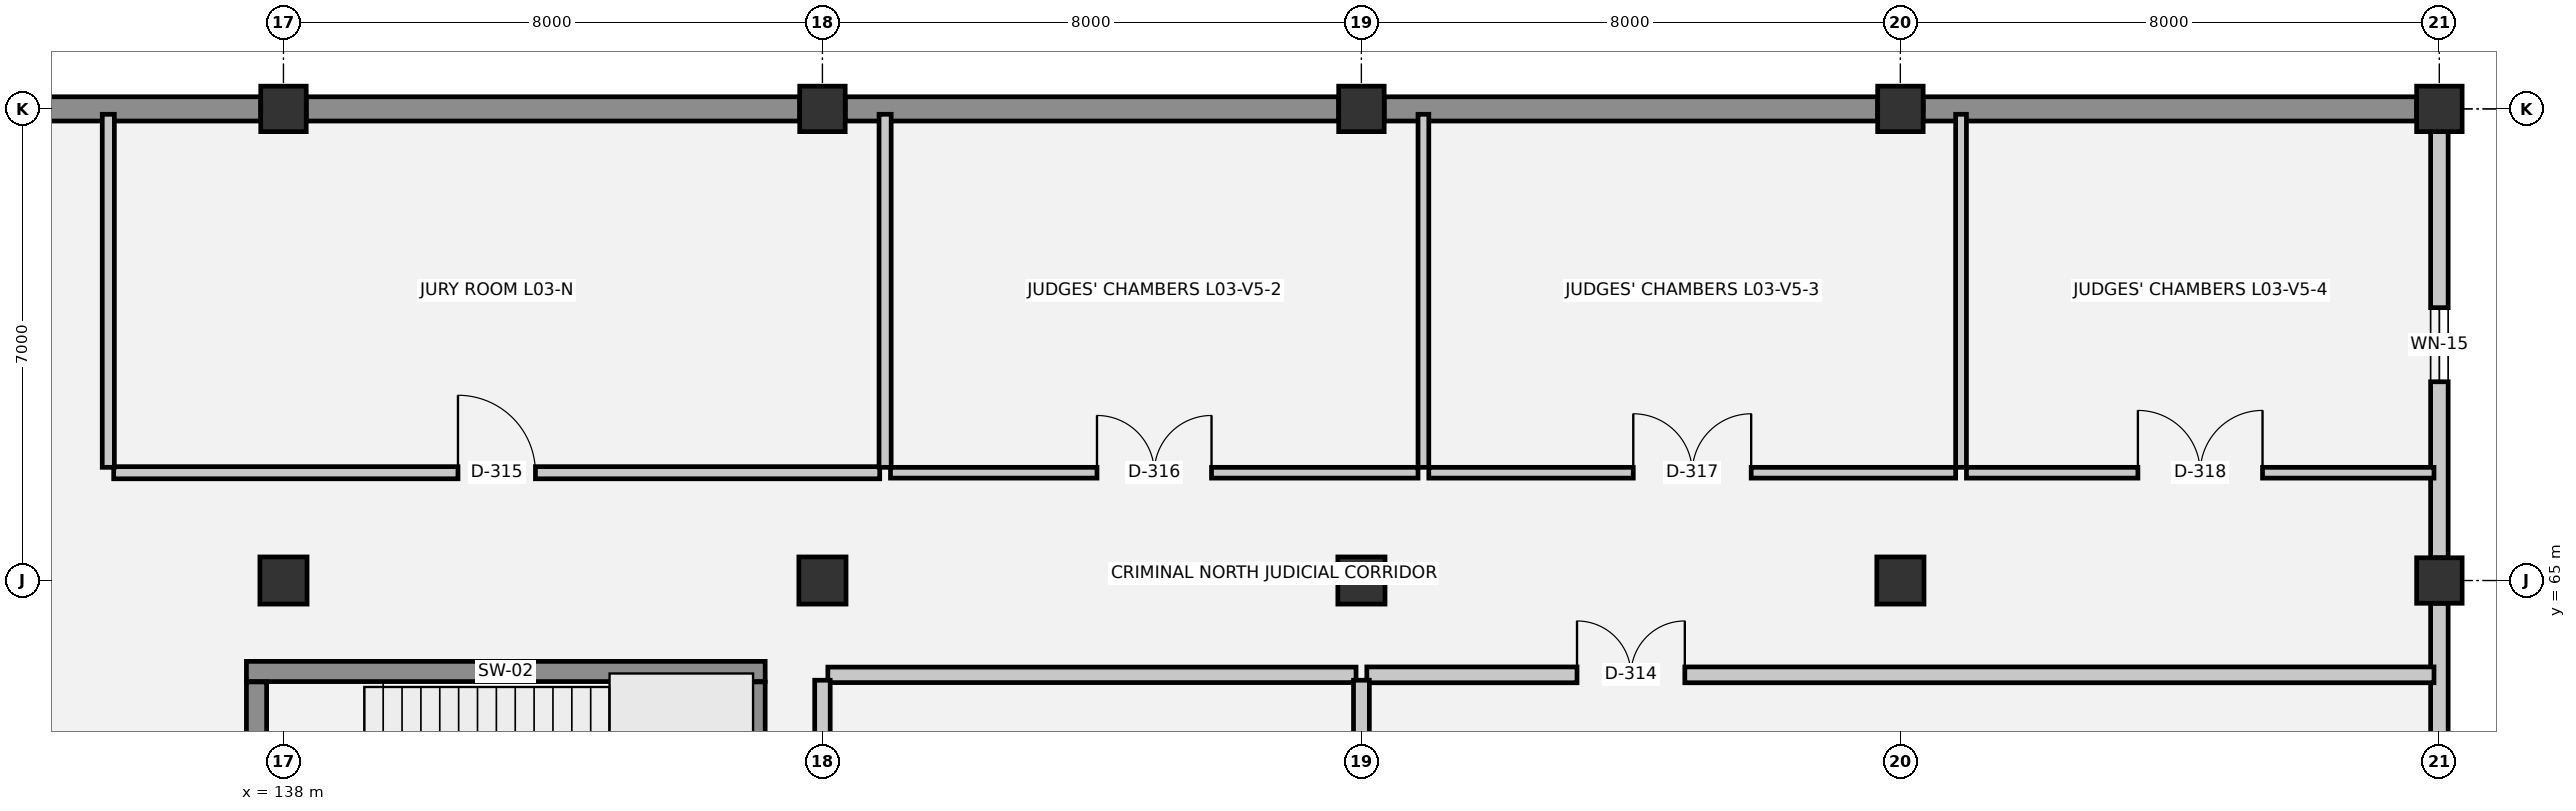
"""IFC4 building model, lengths in metres.
Left out: names, types, materials, properties, quantities, classifications, styles, units other than length and angle.
Written with IfcOpenShell. Run it as: python <this file> out.ifc"""

import sys

from ifc_helpers import new_model, si_unit, direction, frame, frame_2d, origin, origin_2d, place, context, subcontext, project, spatial, rectangle, extrude, element, fill, save


model = new_model("IFC4")
c1 = context("Model", 3, precision=1e-05, world=origin(), true_north=direction((0.0, 1.0)))
c2 = subcontext(c1, "Body", "Model", "MODEL_VIEW")
j1 = project(units=[si_unit("LENGTHUNIT", "METRE"), si_unit("PLANEANGLEUNIT", "RADIAN")], contexts=[c1])
p1 = place(None, origin())
s1 = spatial("IfcSite", under=j1, at=p1, CompositionType="ELEMENT")
p2 = place(p1, origin())
s2 = spatial("IfcBuilding", under=s1, at=p2, CompositionType="ELEMENT")
p3 = place(p2, frame((0.0, 0.0, 9.9)))
s3 = spatial("IfcBuildingStorey", under=s2, at=p3, CompositionType="ELEMENT", Elevation=9.9)
p4 = place(p3, frame((138.0, 65.0, 0.0), z_axis=(0.0, 0.0, 1.0), x_axis=(1.0, 0.0, 0.0)))
e1 = element("IfcColumn", 1, at=p4, inside=s3, PredefinedType="COLUMN", context=c2, shape_type="SweptSolid", body=[
    extrude(rectangle(XDim=0.7, YDim=0.7, at=origin_2d()), origin(), (0.0, 0.0, 1.0), 4.5),
])
p5 = place(p3, frame((138.0, 72.0, 0.0), z_axis=(0.0, 0.0, 1.0), x_axis=(1.0, 0.0, 0.0)))
e2 = element("IfcColumn", 2, at=p5, inside=s3, PredefinedType="COLUMN", context=c2, shape_type="SweptSolid", body=[
    extrude(rectangle(XDim=0.675, YDim=0.675, at=origin_2d()), origin(), (0.0, 0.0, 1.0), 4.5),
])
p6 = place(p3, frame((146.0, 65.0, 0.0), z_axis=(0.0, 0.0, 1.0), x_axis=(1.0, 0.0, 0.0)))
e3 = element("IfcColumn", 3, at=p6, inside=s3, PredefinedType="COLUMN", context=c2, shape_type="SweptSolid", body=[
    extrude(rectangle(XDim=0.7, YDim=0.7, at=origin_2d()), origin(), (0.0, 0.0, 1.0), 4.5),
])
p7 = place(p3, frame((146.0, 72.0, 0.0), z_axis=(0.0, 0.0, 1.0), x_axis=(1.0, 0.0, 0.0)))
e4 = element("IfcColumn", 4, at=p7, inside=s3, PredefinedType="COLUMN", context=c2, shape_type="SweptSolid", body=[
    extrude(rectangle(XDim=0.675, YDim=0.675, at=origin_2d()), origin(), (0.0, 0.0, 1.0), 4.5),
])
p8 = place(p3, frame((154.0, 65.0, 0.0), z_axis=(0.0, 0.0, 1.0), x_axis=(1.0, 0.0, 0.0)))
e5 = element("IfcColumn", 5, at=p8, inside=s3, PredefinedType="COLUMN", context=c2, shape_type="SweptSolid", body=[
    extrude(rectangle(XDim=0.7, YDim=0.7, at=origin_2d()), origin(), (0.0, 0.0, 1.0), 4.5),
])
p9 = place(p3, frame((154.0, 72.0, 0.0), z_axis=(0.0, 0.0, 1.0), x_axis=(1.0, 0.0, 0.0)))
e6 = element("IfcColumn", 6, at=p9, inside=s3, PredefinedType="COLUMN", context=c2, shape_type="SweptSolid", body=[
    extrude(rectangle(XDim=0.675, YDim=0.675, at=origin_2d()), origin(), (0.0, 0.0, 1.0), 4.5),
])
p10 = place(p3, frame((162.0, 65.0, 0.0), z_axis=(0.0, 0.0, 1.0), x_axis=(1.0, 0.0, 0.0)))
e7 = element("IfcColumn", 7, at=p10, inside=s3, PredefinedType="COLUMN", context=c2, shape_type="SweptSolid", body=[
    extrude(rectangle(XDim=0.7, YDim=0.7, at=origin_2d()), origin(), (0.0, 0.0, 1.0), 4.5),
])
for number, where, z_axis, x_axis in (
    (8, (162.0, 72.0, 0.0), (0.0, 0.0, 1.0), (1.0, 0.0, 0.0)),
    (9, (170.0, 65.0, 0.0), (0.0, 0.0, 1.0), (1.0, 0.0, 0.0)),
    (10, (170.0, 72.0, 0.0), (0.0, 0.0, 1.0), (1.0, 0.0, 0.0)),
):
    element("IfcColumn", number, at=place(p3, frame(where, z_axis=z_axis, x_axis=x_axis)), inside=s3, PredefinedType="COLUMN", context=c2, shape_type="SweptSolid", body=[
        extrude(rectangle(XDim=0.675, YDim=0.675, at=origin_2d()), origin(), (0.0, 0.0, 1.0), 4.5),
    ])
for number, where, z_axis, x_axis in (
    (11, (130.337, 72.0, 0.0), (0.0, 0.0, 1.0), (1.0, 0.0, 0.0)),
    (12, (138.337, 72.0, 0.0), (0.0, 0.0, 1.0), (1.0, 0.0, 0.0)),
    (13, (146.337, 72.0, 0.0), (0.0, 0.0, 1.0), (1.0, 0.0, 0.0)),
    (14, (154.337, 72.0, 0.0), (0.0, 0.0, 1.0), (1.0, 0.0, 0.0)),
    (15, (162.337, 72.0, 0.0), (0.0, 0.0, 1.0), (1.0, 0.0, 0.0)),
):
    element("IfcWall", number, at=place(p3, frame(where, z_axis=z_axis, x_axis=x_axis)), inside=s3, PredefinedType="SOLIDWALL", context=c2, shape_type="SweptSolid", body=[
        extrude(rectangle(XDim=7.325, YDim=0.36, at=frame_2d((3.663, 0.0))), origin(), (0.0, 0.0, 1.0), 4.2),
    ])
p11 = place(p3, frame((170.0, 71.663, 0.0), z_axis=(0.0, 0.0, 1.0), x_axis=(0.0, -1.0, 0.0)))
e16 = element("IfcWall", 16, at=p11, inside=s3, PredefinedType="SOLIDWALL", context=c2, shape_type="SweptSolid", body=[
    extrude(rectangle(XDim=6.325, YDim=0.26, at=frame_2d((3.163, 0.0))), origin(), (0.0, 0.0, 1.0), 3.23),
])
p12 = place(p11, frame((2.613, 0.0, 1.0)))
e17 = element("IfcOpeningElement", 17, at=p12, cuts=e16, PredefinedType="OPENING", context=c2, shape_type="SweptSolid", body=[
    extrude(rectangle(XDim=1.1, YDim=1.2, at=frame_2d((0.55, 0.6))), frame((0.0, 0.14, 0.0), z_axis=(0.0, -1.0, 0.0), x_axis=(1.0, 0.0, 0.0)), (0.0, 0.0, 1.0), 0.28),
])
p13 = place(p3, frame((170.0, 64.663, 0.0), z_axis=(0.0, 0.0, 1.0), x_axis=(0.0, -1.0, 0.0)))
e18 = element("IfcWall", 18, at=p13, inside=s3, PredefinedType="SOLIDWALL", context=c2, shape_type="SweptSolid", body=[
    extrude(rectangle(XDim=13.325, YDim=0.26, at=frame_2d((6.663, 0.0))), origin(), (0.0, 0.0, 1.0), 3.23),
])
p14 = place(p13, frame((6.113, 0.0, 1.0)))
e19 = element("IfcOpeningElement", 19, at=p14, cuts=e18, PredefinedType="OPENING", context=c2, shape_type="SweptSolid", body=[
    extrude(rectangle(XDim=1.1, YDim=1.2, at=frame_2d((0.55, 0.6))), frame((0.0, 0.14, 0.0), z_axis=(0.0, -1.0, 0.0), x_axis=(1.0, 0.0, 0.0)), (0.0, 0.0, 1.0), 0.28),
])
p15 = place(p3, frame((145.15, 63.65, 0.0), z_axis=(0.0, 0.0, 1.0), x_axis=(-1.0, 0.0, 0.0)))
e20 = element("IfcWall", 20, at=p15, inside=s3, PredefinedType="SHEAR", context=c2, shape_type="SweptSolid", body=[
    extrude(rectangle(XDim=7.7, YDim=0.3, at=frame_2d((3.85, 0.0))), origin(), (0.0, 0.0, 1.0), 4.2),
])
for number, where, z_axis, x_axis in (
    (21, (137.6, 63.495, 0.0), (0.0, 0.0, 1.0), (0.0, -1.0, 0.0)),
    (22, (145.0, 59.505, 0.0), (0.0, 0.0, 1.0), (0.0, 1.0, 0.0)),
):
    element("IfcWall", number, at=place(p3, frame(where, z_axis=z_axis, x_axis=x_axis)), inside=s3, PredefinedType="SHEAR", context=c2, shape_type="SweptSolid", body=[
        extrude(rectangle(XDim=3.99, YDim=0.3, at=frame_2d((1.995, 0.0))), origin(), (0.0, 0.0, 1.0), 4.2),
    ])
p16 = place(p3, frame((146.08, 63.6, 0.0), z_axis=(0.0, 0.0, 1.0), x_axis=(1.0, 0.0, 0.0)))
e23 = element("IfcWall", 23, at=p16, inside=s3, PredefinedType="PARTITIONING", context=c2, shape_type="SweptSolid", body=[
    extrude(rectangle(XDim=7.84, YDim=0.23, at=frame_2d((3.92, 0.0))), origin(), (0.0, 0.0, 1.0), 4.14),
])
p17 = place(p3, frame((154.08, 63.6, 0.0), z_axis=(0.0, 0.0, 1.0), x_axis=(1.0, 0.0, 0.0)))
e24 = element("IfcWall", 24, at=p17, inside=s3, PredefinedType="PARTITIONING", context=c2, shape_type="SweptSolid", body=[
    extrude(rectangle(XDim=15.84, YDim=0.235, at=frame_2d((7.92, 0.0))), origin(), (0.0, 0.0, 1.0), 4.14),
])
p18 = place(p17, frame((3.12, 0.0, 0.0)))
e25 = element("IfcOpeningElement", 25, at=p18, cuts=e24, PredefinedType="OPENING", context=c2, shape_type="SweptSolid", body=[
    extrude(rectangle(XDim=1.6, YDim=2.25, at=frame_2d((0.8, 1.125))), frame((0.0, 0.127, 0.0), z_axis=(0.0, -1.0, 0.0), x_axis=(1.0, 0.0, 0.0)), (0.0, 0.0, 1.0), 0.255),
])
p19 = place(p3, frame((135.48, 66.6, 0.0), z_axis=(0.0, 0.0, 1.0), x_axis=(1.0, 0.0, 0.0)))
e26 = element("IfcWall", 26, at=p19, inside=s3, PredefinedType="PARTITIONING", context=c2, shape_type="SweptSolid", body=[
    extrude(rectangle(XDim=11.37, YDim=0.18, at=frame_2d((5.685, 0.0))), origin(), (0.0, 0.0, 1.0), 4.14),
])
p20 = place(p19, frame((5.11, 0.0, 0.0)))
e27 = element("IfcOpeningElement", 27, at=p20, cuts=e26, PredefinedType="OPENING", context=c2, shape_type="SweptSolid", body=[
    extrude(rectangle(XDim=1.15, YDim=2.2, at=frame_2d((0.575, 1.1))), frame((0.0, 0.1, 0.0), z_axis=(0.0, -1.0, 0.0), x_axis=(1.0, 0.0, 0.0)), (0.0, 0.0, 1.0), 0.2),
])
p21 = place(p3, frame((147.01, 66.6, 0.0), z_axis=(0.0, 0.0, 1.0), x_axis=(1.0, 0.0, 0.0)))
e28 = element("IfcWall", 28, at=p21, inside=s3, PredefinedType="PARTITIONING", context=c2, shape_type="SweptSolid", body=[
    extrude(rectangle(XDim=7.83, YDim=0.16, at=frame_2d((3.915, 0.0))), origin(), (0.0, 0.0, 1.0), 4.14),
])
p22 = place(p21, frame((3.065, 0.0, 0.0)))
e29 = element("IfcOpeningElement", 29, at=p22, cuts=e28, PredefinedType="OPENING", context=c2, shape_type="SweptSolid", body=[
    extrude(rectangle(XDim=1.7, YDim=2.3, at=frame_2d((0.85, 1.15))), frame((0.0, 0.09, 0.0), z_axis=(0.0, -1.0, 0.0), x_axis=(1.0, 0.0, 0.0)), (0.0, 0.0, 1.0), 0.18),
])
p23 = place(p3, frame((155.0, 66.6, 0.0), z_axis=(0.0, 0.0, 1.0), x_axis=(1.0, 0.0, 0.0)))
e30 = element("IfcWall", 30, at=p23, inside=s3, PredefinedType="PARTITIONING", context=c2, shape_type="SweptSolid", body=[
    extrude(rectangle(XDim=7.82, YDim=0.16, at=frame_2d((3.91, 0.0))), origin(), (0.0, 0.0, 1.0), 4.14),
])
p24 = place(p23, frame((3.035, 0.0, 0.0)))
e31 = element("IfcOpeningElement", 31, at=p24, cuts=e30, PredefinedType="OPENING", context=c2, shape_type="SweptSolid", body=[
    extrude(rectangle(XDim=1.75, YDim=2.3, at=frame_2d((0.875, 1.15))), frame((0.0, 0.09, 0.0), z_axis=(0.0, -1.0, 0.0), x_axis=(1.0, 0.0, 0.0)), (0.0, 0.0, 1.0), 0.18),
])
p25 = place(p3, frame((162.98, 66.6, 0.0), z_axis=(0.0, 0.0, 1.0), x_axis=(1.0, 0.0, 0.0)))
e32 = element("IfcWall", 32, at=p25, inside=s3, PredefinedType="PARTITIONING", context=c2, shape_type="SweptSolid", body=[
    extrude(rectangle(XDim=6.94, YDim=0.16, at=frame_2d((3.47, 0.0))), origin(), (0.0, 0.0, 1.0), 4.14),
])
p26 = place(p25, frame((2.545, 0.0, 0.0)))
e33 = element("IfcOpeningElement", 33, at=p26, cuts=e32, PredefinedType="OPENING", context=c2, shape_type="SweptSolid", body=[
    extrude(rectangle(XDim=1.85, YDim=2.3, at=frame_2d((0.925, 1.15))), frame((0.0, 0.09, 0.0), z_axis=(0.0, -1.0, 0.0), x_axis=(1.0, 0.0, 0.0)), (0.0, 0.0, 1.0), 0.18),
])
p27 = place(p3, frame((135.4, 66.68, 0.0), z_axis=(0.0, 0.0, 1.0), x_axis=(0.0, 1.0, 0.0)))
e34 = element("IfcWall", 34, at=p27, inside=s3, PredefinedType="PARTITIONING", context=c2, shape_type="SweptSolid", body=[
    extrude(rectangle(XDim=5.24, YDim=0.18, at=frame_2d((2.62, 0.0))), origin(), (0.0, 0.0, 1.0), 4.14),
])
p28 = place(p3, frame((146.0, 51.35, 0.0), z_axis=(0.0, 0.0, 1.0), x_axis=(0.0, 1.0, 0.0)))
e35 = element("IfcWall", 35, at=p28, inside=s3, PredefinedType="PARTITIONING", context=c2, shape_type="SweptSolid", body=[
    extrude(rectangle(XDim=12.17, YDim=0.23, at=frame_2d((6.085, 0.0))), origin(), (0.0, 0.0, 1.0), 3.25),
])
p29 = place(p28, frame((5.31, 0.0, 0.0)))
e36 = element("IfcOpeningElement", 36, at=p29, cuts=e35, PredefinedType="OPENING", context=c2, shape_type="SweptSolid", body=[
    extrude(rectangle(XDim=1.55, YDim=2.25, at=frame_2d((0.775, 1.125))), frame((0.0, 0.125, 0.0), z_axis=(0.0, -1.0, 0.0), x_axis=(1.0, 0.0, 0.0)), (0.0, 0.0, 1.0), 0.25),
])
p30 = place(p3, frame((146.93, 66.68, 0.0), z_axis=(0.0, 0.0, 1.0), x_axis=(0.0, 1.0, 0.0)))
e37 = element("IfcWall", 37, at=p30, inside=s3, PredefinedType="PARTITIONING", context=c2, shape_type="SweptSolid", body=[
    extrude(rectangle(XDim=5.24, YDim=0.18, at=frame_2d((2.62, 0.0))), origin(), (0.0, 0.0, 1.0), 4.14),
])
p31 = place(p3, frame((154.0, 51.08, 0.0), z_axis=(0.0, 0.0, 1.0), x_axis=(0.0, 1.0, 0.0)))
e38 = element("IfcWall", 38, at=p31, inside=s3, PredefinedType="PARTITIONING", context=c2, shape_type="SweptSolid", body=[
    extrude(rectangle(XDim=12.44, YDim=0.235, at=frame_2d((6.22, 0.0))), origin(), (0.0, 0.0, 1.0), 3.25),
])
for number, where, z_axis, x_axis in (
    (39, (154.92, 66.68, 0.0), (0.0, 0.0, 1.0), (0.0, 1.0, 0.0)),
    (40, (162.9, 66.68, 0.0), (0.0, 0.0, 1.0), (0.0, 1.0, 0.0)),
):
    element("IfcWall", number, at=place(p3, frame(where, z_axis=z_axis, x_axis=x_axis)), inside=s3, PredefinedType="PARTITIONING", context=c2, shape_type="SweptSolid", body=[
        extrude(rectangle(XDim=5.24, YDim=0.16, at=frame_2d((2.62, 0.0))), origin(), (0.0, 0.0, 1.0), 4.14),
    ])
p32 = place(p12, origin())
e41 = element("IfcWindow", 41, at=p32, inside=s3, PartitioningType="SINGLE_PANEL", PredefinedType="WINDOW", context=c2, shape_type="SweptSolid", body=[
    extrude(rectangle(XDim=1.1, YDim=1.2, at=frame_2d((0.55, 0.6))), frame((0.0, 0.03, 0.0), z_axis=(0.0, -1.0, 0.0), x_axis=(1.0, 0.0, 0.0)), (0.0, 0.0, 1.0), 0.06),
])
fill(e17, e41)
p33 = place(p18, origin())
e42 = element("IfcDoor", 42, at=p33, inside=s3, OperationType="DOUBLE_DOOR_SINGLE_SWING", PredefinedType="DOOR", context=c2, shape_type="SweptSolid", body=[
    extrude(rectangle(XDim=1.6, YDim=2.25, at=frame_2d((0.8, 1.125))), frame((0.0, 0.025, 0.0), z_axis=(0.0, -1.0, 0.0), x_axis=(1.0, 0.0, 0.0)), (0.0, 0.0, 1.0), 0.05),
])
fill(e25, e42)
p34 = place(p20, origin())
e43 = element("IfcDoor", 43, at=p34, inside=s3, OperationType="SINGLE_SWING_LEFT", PredefinedType="DOOR", context=c2, shape_type="SweptSolid", body=[
    extrude(rectangle(XDim=1.15, YDim=2.2, at=frame_2d((0.575, 1.1))), frame((0.0, 0.025, 0.0), z_axis=(0.0, -1.0, 0.0), x_axis=(1.0, 0.0, 0.0)), (0.0, 0.0, 1.0), 0.05),
])
fill(e27, e43)
p35 = place(p22, origin())
e44 = element("IfcDoor", 44, at=p35, inside=s3, OperationType="DOUBLE_DOOR_SINGLE_SWING", PredefinedType="DOOR", context=c2, shape_type="SweptSolid", body=[
    extrude(rectangle(XDim=1.7, YDim=2.3, at=frame_2d((0.85, 1.15))), frame((0.0, 0.025, 0.0), z_axis=(0.0, -1.0, 0.0), x_axis=(1.0, 0.0, 0.0)), (0.0, 0.0, 1.0), 0.05),
])
fill(e29, e44)
p36 = place(p24, origin())
e45 = element("IfcDoor", 45, at=p36, inside=s3, OperationType="DOUBLE_DOOR_SINGLE_SWING", PredefinedType="DOOR", context=c2, shape_type="SweptSolid", body=[
    extrude(rectangle(XDim=1.75, YDim=2.3, at=frame_2d((0.875, 1.15))), frame((0.0, 0.025, 0.0), z_axis=(0.0, -1.0, 0.0), x_axis=(1.0, 0.0, 0.0)), (0.0, 0.0, 1.0), 0.05),
])
fill(e31, e45)
p37 = place(p26, origin())
e46 = element("IfcDoor", 46, at=p37, inside=s3, OperationType="DOUBLE_DOOR_SINGLE_SWING", PredefinedType="DOOR", context=c2, shape_type="SweptSolid", body=[
    extrude(rectangle(XDim=1.85, YDim=2.3, at=frame_2d((0.925, 1.15))), frame((0.0, 0.025, 0.0), z_axis=(0.0, -1.0, 0.0), x_axis=(1.0, 0.0, 0.0)), (0.0, 0.0, 1.0), 0.05),
])
fill(e33, e46)
save(model, sys.argv[1])
